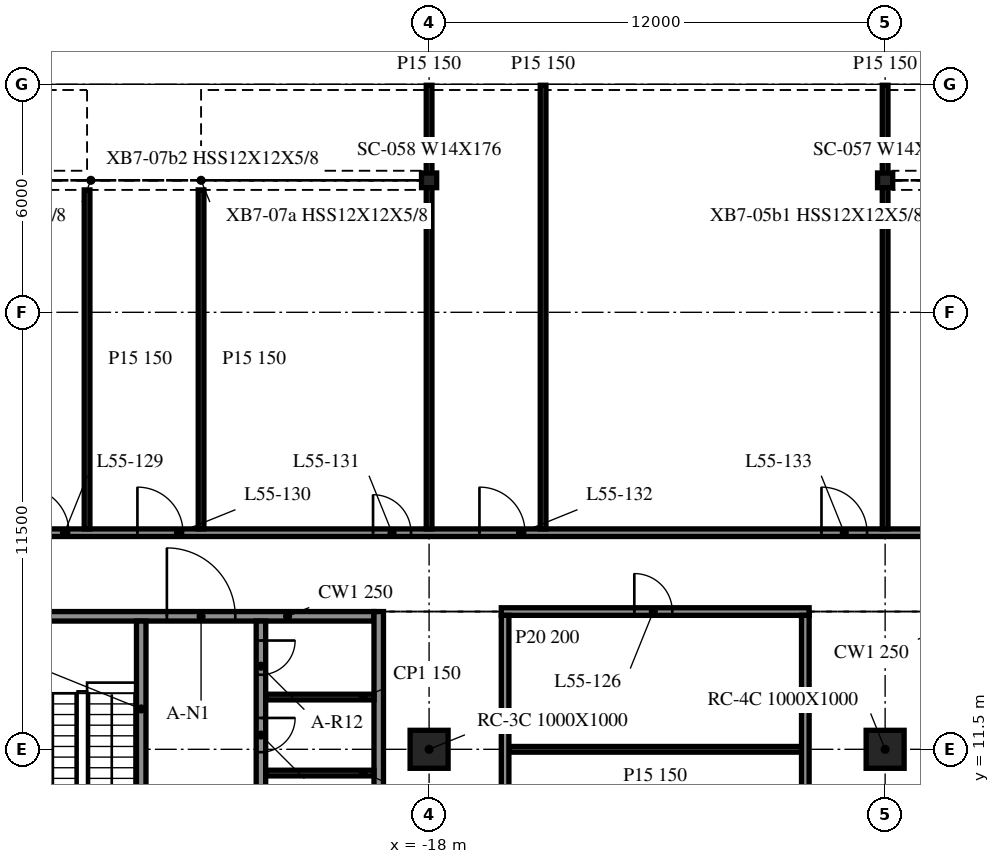
"""IFC4 building model, lengths in metres.
Left out: names, types, materials, properties, quantities, classifications, styles, units other than length and angle.
Written with IfcOpenShell. Run it as: python <this file> out.ifc"""

import sys

from ifc_helpers import new_model, si_unit, direction, frame, frame_2d, origin, origin_2d, place, context, subcontext, project, spatial, rectangle, i_section, extrude, element, fill, save


model = new_model("IFC4")
c1 = context("Model", 3, precision=1e-05, world=origin(), true_north=direction((0.0, 1.0)))
c2 = subcontext(c1, "Body", "Model", "MODEL_VIEW")
j1 = project(units=[si_unit("LENGTHUNIT", "METRE"), si_unit("PLANEANGLEUNIT", "RADIAN")], contexts=[c1])
p1 = place(None, origin())
s1 = spatial("IfcSite", under=j1, at=p1, CompositionType="ELEMENT")
p2 = place(p1, origin())
s2 = spatial("IfcBuilding", under=s1, at=p2, CompositionType="ELEMENT")
p3 = place(p2, frame((0.0, 0.0, 228.6)))
s3 = spatial("IfcBuildingStorey", under=s2, at=p3, CompositionType="ELEMENT", Elevation=228.6)
for number, where, z_axis, x_axis in (
    (1, (-18.0, 11.5, -0.34), (0.0, 0.0, 1.0), (1.0, 0.0, 0.0)),
    (2, (-6.0, 11.5, -0.34), (0.0, 0.0, 1.0), (1.0, 0.0, 0.0)),
):
    element("IfcColumn", number, at=place(p3, frame(where, z_axis=z_axis, x_axis=x_axis)), inside=s3, PredefinedType="COLUMN", context=c2, shape_type="SweptSolid", body=[
        extrude(rectangle(XDim=1.0, YDim=1.0, at=origin_2d()), origin(), (0.0, 0.0, 1.0), 3.8),
    ])
for number, where, z_axis, x_axis in (
    (3, (-6.0, 26.473, -0.34), (0.0, 0.0, 1.0), (1.0, 0.0, 0.0)),
    (4, (-18.0, 26.473, -0.34), (0.0, 0.0, 1.0), (1.0, 0.0, 0.0)),
):
    element("IfcColumn", number, at=place(p3, frame(where, z_axis=z_axis, x_axis=x_axis)), inside=s3, PredefinedType="COLUMN", context=c2, shape_type="SweptSolid", body=[
        extrude(i_section(OverallWidth=0.399, OverallDepth=0.386, WebThickness=0.021, FlangeThickness=0.033, at=origin_2d()), origin(), (0.0, 0.0, 1.0), 3.8),
    ])
p4 = place(p3, frame((-19.325, -9.125, 0.0), z_axis=(0.0, 0.0, 1.0), x_axis=(0.0, 1.0, 0.0)))
e5 = element("IfcWall", 5, at=p4, inside=s3, PredefinedType="SOLIDWALL", context=c2, shape_type="SweptSolid", body=[
    extrude(rectangle(XDim=24.25, YDim=0.25, at=frame_2d((12.125, 0.0))), origin(), (0.0, 0.0, 1.0), 3.46),
])
p5 = place(p3, frame((-28.55, 15.0, 0.0), z_axis=(0.0, 0.0, 1.0), x_axis=(1.0, 0.0, 0.0)))
e6 = element("IfcWall", 6, at=p5, inside=s3, PredefinedType="SOLIDWALL", context=c2, shape_type="SweptSolid", body=[
    extrude(rectangle(XDim=9.1, YDim=0.25, at=frame_2d((4.55, 0.0))), origin(), (0.0, 0.0, 1.0), 3.46),
])
p6 = place(p5, frame((3.65, 0.0, 0.0)))
e7 = element("IfcOpeningElement", 7, at=p6, cuts=e6, PredefinedType="OPENING", context=c2, shape_type="SweptSolid", body=[
    extrude(rectangle(XDim=1.8, YDim=2.1, at=frame_2d((0.9, 1.05))), frame((0.0, 0.135, 0.0), z_axis=(0.0, -1.0, 0.0), x_axis=(1.0, 0.0, 0.0)), (0.0, 0.0, 1.0), 0.27),
])
p7 = place(p3, frame((-25.575, 14.875, 0.0), z_axis=(0.0, 0.0, 1.0), x_axis=(0.0, -1.0, 0.0)))
e8 = element("IfcWall", 8, at=p7, inside=s3, PredefinedType="SOLIDWALL", context=c2, shape_type="SweptSolid", body=[
    extrude(rectangle(XDim=6.25, YDim=0.25, at=frame_2d((3.125, 0.0))), origin(), (0.0, 0.0, 1.0), 3.46),
])
p8 = place(p7, frame((4.85, 0.0, 0.0)))
e9 = element("IfcOpeningElement", 9, at=p8, cuts=e8, PredefinedType="OPENING", context=c2, shape_type="SweptSolid", body=[
    extrude(rectangle(XDim=1.0, YDim=2.1, at=frame_2d((0.5, 1.05))), frame((0.0, 0.135, 0.0), z_axis=(0.0, -1.0, 0.0), x_axis=(1.0, 0.0, 0.0)), (0.0, 0.0, 1.0), 0.27),
])
p9 = place(p3, frame((-22.425, 14.875, 0.0), z_axis=(0.0, 0.0, 1.0), x_axis=(0.0, -1.0, 0.0)))
e10 = element("IfcWall", 10, at=p9, inside=s3, PredefinedType="SOLIDWALL", context=c2, shape_type="SweptSolid", body=[
    extrude(rectangle(XDim=23.75, YDim=0.25, at=frame_2d((11.875, 0.0))), origin(), (0.0, 0.0, 1.0), 3.46),
])
p10 = place(p9, frame((15.494, 0.0, 0.0)))
e11 = element("IfcOpeningElement", 11, at=p10, cuts=e10, PredefinedType="OPENING", context=c2, shape_type="SweptSolid", body=[
    extrude(rectangle(XDim=0.9, YDim=2.1, at=frame_2d((0.45, 1.05))), frame((0.0, 0.135, 0.0), z_axis=(0.0, -1.0, 0.0), x_axis=(1.0, 0.0, 0.0)), (0.0, 0.0, 1.0), 0.27),
])
p11 = place(p9, frame((11.425, 0.0, 0.0)))
e12 = element("IfcOpeningElement", 12, at=p11, cuts=e10, PredefinedType="OPENING", context=c2, shape_type="SweptSolid", body=[
    extrude(rectangle(XDim=0.9, YDim=2.1, at=frame_2d((0.45, 1.05))), frame((0.0, 0.135, 0.0), z_axis=(0.0, -1.0, 0.0), x_axis=(1.0, 0.0, 0.0)), (0.0, 0.0, 1.0), 0.27),
])
p12 = place(p9, frame((7.356, 0.0, 0.0)))
e13 = element("IfcOpeningElement", 13, at=p12, cuts=e10, PredefinedType="OPENING", context=c2, shape_type="SweptSolid", body=[
    extrude(rectangle(XDim=0.9, YDim=2.1, at=frame_2d((0.45, 1.05))), frame((0.0, 0.135, 0.0), z_axis=(0.0, -1.0, 0.0), x_axis=(1.0, 0.0, 0.0)), (0.0, 0.0, 1.0), 0.27),
])
p13 = place(p9, frame((21.837, 0.0, 0.0)))
e14 = element("IfcOpeningElement", 14, at=p13, cuts=e10, PredefinedType="OPENING", context=c2, shape_type="SweptSolid", body=[
    extrude(rectangle(XDim=0.9, YDim=2.1, at=frame_2d((0.45, 1.05))), frame((0.0, 0.135, 0.0), z_axis=(0.0, -1.0, 0.0), x_axis=(1.0, 0.0, 0.0)), (0.0, 0.0, 1.0), 0.27),
])
p14 = place(p9, frame((18.762, 0.0, 0.0)))
e15 = element("IfcOpeningElement", 15, at=p14, cuts=e10, PredefinedType="OPENING", context=c2, shape_type="SweptSolid", body=[
    extrude(rectangle(XDim=0.9, YDim=2.1, at=frame_2d((0.45, 1.05))), frame((0.0, 0.135, 0.0), z_axis=(0.0, -1.0, 0.0), x_axis=(1.0, 0.0, 0.0)), (0.0, 0.0, 1.0), 0.27),
])
p15 = place(p9, frame((4.587, 0.0, 0.0)))
e16 = element("IfcOpeningElement", 16, at=p15, cuts=e10, PredefinedType="OPENING", context=c2, shape_type="SweptSolid", body=[
    extrude(rectangle(XDim=0.9, YDim=2.1, at=frame_2d((0.45, 1.05))), frame((0.0, 0.135, 0.0), z_axis=(0.0, -1.0, 0.0), x_axis=(1.0, 0.0, 0.0)), (0.0, 0.0, 1.0), 0.27),
])
p16 = place(p9, frame((2.55, 0.0, 0.0)))
e17 = element("IfcOpeningElement", 17, at=p16, cuts=e10, PredefinedType="OPENING", context=c2, shape_type="SweptSolid", body=[
    extrude(rectangle(XDim=0.9, YDim=2.1, at=frame_2d((0.45, 1.05))), frame((0.0, 0.135, 0.0), z_axis=(0.0, -1.0, 0.0), x_axis=(1.0, 0.0, 0.0)), (0.0, 0.0, 1.0), 0.27),
])
p17 = place(p9, frame((0.512, 0.0, 0.0)))
e18 = element("IfcOpeningElement", 18, at=p17, cuts=e10, PredefinedType="OPENING", context=c2, shape_type="SweptSolid", body=[
    extrude(rectangle(XDim=0.9, YDim=2.1, at=frame_2d((0.45, 1.05))), frame((0.0, 0.135, 0.0), z_axis=(0.0, -1.0, 0.0), x_axis=(1.0, 0.0, 0.0)), (0.0, 0.0, 1.0), 0.27),
])
for number, where, z_axis, x_axis in (
    (19, (-22.3, 10.875, 0.0), (0.0, 0.0, 1.0), (1.0, 0.0, 0.0)),
    (20, (-22.3, 12.875, 0.0), (0.0, 0.0, 1.0), (1.0, 0.0, 0.0)),
):
    element("IfcWall", number, at=place(p3, frame(where, z_axis=z_axis, x_axis=x_axis)), inside=s3, PredefinedType="PARTITIONING", context=c2, shape_type="SweptSolid", body=[
        extrude(rectangle(XDim=2.85, YDim=0.15, at=frame_2d((1.425, 0.0))), origin(), (0.0, 0.0, 1.0), 3.46),
    ])
p18 = place(p3, frame((-15.9, 11.5, 0.0), z_axis=(0.0, 0.0, 1.0), x_axis=(1.0, 0.0, 0.0)))
e21 = element("IfcWall", 21, at=p18, inside=s3, PredefinedType="PARTITIONING", context=c2, shape_type="SweptSolid", body=[
    extrude(rectangle(XDim=7.7, YDim=0.15, at=frame_2d((3.85, 0.0))), origin(), (0.0, 0.0, 1.0), 3.46),
])
p19 = place(p3, frame((-16.1, 15.125, 0.0), z_axis=(0.0, 0.0, 1.0), x_axis=(1.0, 0.0, 0.0)))
e22 = element("IfcWall", 22, at=p19, inside=s3, PredefinedType="PARTITIONING", context=c2, shape_type="SweptSolid", body=[
    extrude(rectangle(XDim=8.1, YDim=0.2, at=frame_2d((4.05, 0.0))), origin(), (0.0, 0.0, 1.0), 3.46),
])
p20 = place(p19, frame((3.5, 0.0, 0.0)))
e23 = element("IfcOpeningElement", 23, at=p20, cuts=e22, PredefinedType="OPENING", context=c2, shape_type="SweptSolid", body=[
    extrude(rectangle(XDim=1.0, YDim=2.1, at=frame_2d((0.5, 1.05))), frame((0.0, 0.11, 0.0), z_axis=(0.0, -1.0, 0.0), x_axis=(1.0, 0.0, 0.0)), (0.0, 0.0, 1.0), 0.22),
])
p21 = place(p3, frame((-41.975, 17.2, 0.0), z_axis=(0.0, 0.0, 1.0), x_axis=(1.0, 0.0, 0.0)))
e24 = element("IfcWall", 24, at=p21, inside=s3, PredefinedType="PARTITIONING", context=c2, shape_type="SweptSolid", body=[
    extrude(rectangle(XDim=95.95, YDim=0.2, at=frame_2d((47.975, 0.0))), origin(), (0.0, 0.0, 1.0), 3.46),
])
p22 = place(p21, frame((4.5, 0.0, 0.0)))
e25 = element("IfcOpeningElement", 25, at=p22, cuts=e24, PredefinedType="OPENING", context=c2, shape_type="SweptSolid", body=[
    extrude(rectangle(XDim=1.0, YDim=2.1, at=frame_2d((0.5, 1.05))), frame((0.0, 0.11, 0.0), z_axis=(0.0, -1.0, 0.0), x_axis=(1.0, 0.0, 0.0)), (0.0, 0.0, 1.0), 0.22),
])
p23 = place(p21, frame((13.3, 0.0, 0.0)))
e26 = element("IfcOpeningElement", 26, at=p23, cuts=e24, PredefinedType="OPENING", context=c2, shape_type="SweptSolid", body=[
    extrude(rectangle(XDim=1.2, YDim=2.1, at=frame_2d((0.6, 1.05))), frame((0.0, 0.11, 0.0), z_axis=(0.0, -1.0, 0.0), x_axis=(1.0, 0.0, 0.0)), (0.0, 0.0, 1.0), 0.22),
])
p24 = place(p21, frame((16.3, 0.0, 0.0)))
e27 = element("IfcOpeningElement", 27, at=p24, cuts=e24, PredefinedType="OPENING", context=c2, shape_type="SweptSolid", body=[
    extrude(rectangle(XDim=1.2, YDim=2.1, at=frame_2d((0.6, 1.05))), frame((0.0, 0.11, 0.0), z_axis=(0.0, -1.0, 0.0), x_axis=(1.0, 0.0, 0.0)), (0.0, 0.0, 1.0), 0.22),
])
p25 = place(p21, frame((22.5, 0.0, 0.0)))
e28 = element("IfcOpeningElement", 28, at=p25, cuts=e24, PredefinedType="OPENING", context=c2, shape_type="SweptSolid", body=[
    extrude(rectangle(XDim=1.0, YDim=2.1, at=frame_2d((0.5, 1.05))), frame((0.0, 0.11, 0.0), z_axis=(0.0, -1.0, 0.0), x_axis=(1.0, 0.0, 0.0)), (0.0, 0.0, 1.0), 0.22),
])
p26 = place(p21, frame((25.3, 0.0, 0.0)))
e29 = element("IfcOpeningElement", 29, at=p26, cuts=e24, PredefinedType="OPENING", context=c2, shape_type="SweptSolid", body=[
    extrude(rectangle(XDim=1.2, YDim=2.1, at=frame_2d((0.6, 1.05))), frame((0.0, 0.11, 0.0), z_axis=(0.0, -1.0, 0.0), x_axis=(1.0, 0.0, 0.0)), (0.0, 0.0, 1.0), 0.22),
])
p27 = place(p21, frame((34.3, 0.0, 0.0)))
e30 = element("IfcOpeningElement", 30, at=p27, cuts=e24, PredefinedType="OPENING", context=c2, shape_type="SweptSolid", body=[
    extrude(rectangle(XDim=1.2, YDim=2.1, at=frame_2d((0.6, 1.05))), frame((0.0, 0.11, 0.0), z_axis=(0.0, -1.0, 0.0), x_axis=(1.0, 0.0, 0.0)), (0.0, 0.0, 1.0), 0.22),
])
p28 = place(p21, frame((42.7, 0.0, 0.0)))
e31 = element("IfcOpeningElement", 31, at=p28, cuts=e24, PredefinedType="OPENING", context=c2, shape_type="SweptSolid", body=[
    extrude(rectangle(XDim=1.0, YDim=2.1, at=frame_2d((0.5, 1.05))), frame((0.0, 0.11, 0.0), z_axis=(0.0, -1.0, 0.0), x_axis=(1.0, 0.0, 0.0)), (0.0, 0.0, 1.0), 0.22),
])
p29 = place(p21, frame((47.3, 0.0, 0.0)))
e32 = element("IfcOpeningElement", 32, at=p29, cuts=e24, PredefinedType="OPENING", context=c2, shape_type="SweptSolid", body=[
    extrude(rectangle(XDim=1.2, YDim=2.1, at=frame_2d((0.6, 1.05))), frame((0.0, 0.11, 0.0), z_axis=(0.0, -1.0, 0.0), x_axis=(1.0, 0.0, 0.0)), (0.0, 0.0, 1.0), 0.22),
])
p30 = place(p21, frame((51.1, 0.0, 0.0)))
e33 = element("IfcOpeningElement", 33, at=p30, cuts=e24, PredefinedType="OPENING", context=c2, shape_type="SweptSolid", body=[
    extrude(rectangle(XDim=1.2, YDim=2.1, at=frame_2d((0.6, 1.05))), frame((0.0, 0.11, 0.0), z_axis=(0.0, -1.0, 0.0), x_axis=(1.0, 0.0, 0.0)), (0.0, 0.0, 1.0), 0.22),
])
p31 = place(p21, frame((54.1, 0.0, 0.0)))
e34 = element("IfcOpeningElement", 34, at=p31, cuts=e24, PredefinedType="OPENING", context=c2, shape_type="SweptSolid", body=[
    extrude(rectangle(XDim=1.0, YDim=2.1, at=frame_2d((0.5, 1.05))), frame((0.0, 0.11, 0.0), z_axis=(0.0, -1.0, 0.0), x_axis=(1.0, 0.0, 0.0)), (0.0, 0.0, 1.0), 0.22),
])
p32 = place(p21, frame((60.1, 0.0, 0.0)))
e35 = element("IfcOpeningElement", 35, at=p32, cuts=e24, PredefinedType="OPENING", context=c2, shape_type="SweptSolid", body=[
    extrude(rectangle(XDim=1.2, YDim=2.1, at=frame_2d((0.6, 1.05))), frame((0.0, 0.11, 0.0), z_axis=(0.0, -1.0, 0.0), x_axis=(1.0, 0.0, 0.0)), (0.0, 0.0, 1.0), 0.22),
])
p33 = place(p21, frame((63.1, 0.0, 0.0)))
e36 = element("IfcOpeningElement", 36, at=p33, cuts=e24, PredefinedType="OPENING", context=c2, shape_type="SweptSolid", body=[
    extrude(rectangle(XDim=1.2, YDim=2.1, at=frame_2d((0.6, 1.05))), frame((0.0, 0.11, 0.0), z_axis=(0.0, -1.0, 0.0), x_axis=(1.0, 0.0, 0.0)), (0.0, 0.0, 1.0), 0.22),
])
p34 = place(p21, frame((72.1, 0.0, 0.0)))
e37 = element("IfcOpeningElement", 37, at=p34, cuts=e24, PredefinedType="OPENING", context=c2, shape_type="SweptSolid", body=[
    extrude(rectangle(XDim=1.0, YDim=2.1, at=frame_2d((0.5, 1.05))), frame((0.0, 0.11, 0.0), z_axis=(0.0, -1.0, 0.0), x_axis=(1.0, 0.0, 0.0)), (0.0, 0.0, 1.0), 0.22),
])
p35 = place(p21, frame((78.1, 0.0, 0.0)))
e38 = element("IfcOpeningElement", 38, at=p35, cuts=e24, PredefinedType="OPENING", context=c2, shape_type="SweptSolid", body=[
    extrude(rectangle(XDim=1.2, YDim=2.1, at=frame_2d((0.6, 1.05))), frame((0.0, 0.11, 0.0), z_axis=(0.0, -1.0, 0.0), x_axis=(1.0, 0.0, 0.0)), (0.0, 0.0, 1.0), 0.22),
])
p36 = place(p21, frame((87.1, 0.0, 0.0)))
e39 = element("IfcOpeningElement", 39, at=p36, cuts=e24, PredefinedType="OPENING", context=c2, shape_type="SweptSolid", body=[
    extrude(rectangle(XDim=1.2, YDim=2.1, at=frame_2d((0.6, 1.05))), frame((0.0, 0.11, 0.0), z_axis=(0.0, -1.0, 0.0), x_axis=(1.0, 0.0, 0.0)), (0.0, 0.0, 1.0), 0.22),
])
p37 = place(p21, frame((90.1, 0.0, 0.0)))
e40 = element("IfcOpeningElement", 40, at=p37, cuts=e24, PredefinedType="OPENING", context=c2, shape_type="SweptSolid", body=[
    extrude(rectangle(XDim=1.0, YDim=2.1, at=frame_2d((0.5, 1.05))), frame((0.0, 0.11, 0.0), z_axis=(0.0, -1.0, 0.0), x_axis=(1.0, 0.0, 0.0)), (0.0, 0.0, 1.0), 0.22),
])
for number, where, z_axis, x_axis in (
    (41, (-27.0, 17.3, 0.0), (0.0, 0.0, 1.0), (0.0, 1.0, 0.0)),
    (42, (-24.0, 17.3, 0.0), (0.0, 0.0, 1.0), (0.0, 1.0, 0.0)),
):
    element("IfcWall", number, at=place(p3, frame(where, z_axis=z_axis, x_axis=x_axis)), inside=s3, PredefinedType="PARTITIONING", context=c2, shape_type="SweptSolid", body=[
        extrude(rectangle(XDim=8.921, YDim=0.15, at=frame_2d((4.46, 0.0))), origin(), (0.0, 0.0, 1.0), 3.46),
    ])
p38 = place(p3, frame((-18.0, 17.3, 0.0), z_axis=(0.0, 0.0, 1.0), x_axis=(0.0, 1.0, 0.0)))
e43 = element("IfcWall", 43, at=p38, inside=s3, PredefinedType="PARTITIONING", context=c2, shape_type="SweptSolid", body=[
    extrude(rectangle(XDim=11.675, YDim=0.15, at=frame_2d((5.837, 0.0))), origin(), (0.0, 0.0, 1.0), 3.46),
])
p39 = place(p3, frame((-16.0, -9.025, 0.0), z_axis=(0.0, 0.0, 1.0), x_axis=(0.0, 1.0, 0.0)))
e44 = element("IfcWall", 44, at=p39, inside=s3, PredefinedType="PARTITIONING", context=c2, shape_type="SweptSolid", body=[
    extrude(rectangle(XDim=24.05, YDim=0.2, at=frame_2d((12.025, 0.0))), origin(), (0.0, 0.0, 1.0), 3.46),
])
p40 = place(p39, frame((11.5, 0.0, 0.0)))
e45 = element("IfcOpeningElement", 45, at=p40, cuts=e44, PredefinedType="OPENING", context=c2, shape_type="SweptSolid", body=[
    extrude(rectangle(XDim=0.9, YDim=2.1, at=frame_2d((0.45, 1.05))), frame((0.0, 0.11, 0.0), z_axis=(0.0, -1.0, 0.0), x_axis=(1.0, 0.0, 0.0)), (0.0, 0.0, 1.0), 0.22),
])
p41 = place(p3, frame((-15.0, 17.3, 0.0), z_axis=(0.0, 0.0, 1.0), x_axis=(0.0, 1.0, 0.0)))
e46 = element("IfcWall", 46, at=p41, inside=s3, PredefinedType="PARTITIONING", context=c2, shape_type="SweptSolid", body=[
    extrude(rectangle(XDim=11.675, YDim=0.15, at=frame_2d((5.837, 0.0))), origin(), (0.0, 0.0, 1.0), 3.46),
])
p42 = place(p3, frame((-8.1, -9.025, 0.0), z_axis=(0.0, 0.0, 1.0), x_axis=(0.0, 1.0, 0.0)))
e47 = element("IfcWall", 47, at=p42, inside=s3, PredefinedType="PARTITIONING", context=c2, shape_type="SweptSolid", body=[
    extrude(rectangle(XDim=24.05, YDim=0.2, at=frame_2d((12.025, 0.0))), origin(), (0.0, 0.0, 1.0), 3.46),
])
p43 = place(p3, frame((-6.0, 17.3, 0.0), z_axis=(0.0, 0.0, 1.0), x_axis=(0.0, 1.0, 0.0)))
e48 = element("IfcWall", 48, at=p43, inside=s3, PredefinedType="PARTITIONING", context=c2, shape_type="SweptSolid", body=[
    extrude(rectangle(XDim=11.675, YDim=0.15, at=frame_2d((5.837, 0.0))), origin(), (0.0, 0.0, 1.0), 3.46),
])
p44 = place(p6, origin())
e49 = element("IfcDoor", 49, at=p44, inside=s3, OperationType="DOUBLE_DOOR_SINGLE_SWING", PredefinedType="DOOR", context=c2, shape_type="SweptSolid", body=[
    extrude(rectangle(XDim=1.8, YDim=2.1, at=frame_2d((0.9, 1.05))), frame((0.0, 0.025, 0.0), z_axis=(0.0, -1.0, 0.0), x_axis=(1.0, 0.0, 0.0)), (0.0, 0.0, 1.0), 0.05),
])
fill(e7, e49)
p45 = place(p16, origin())
e50 = element("IfcDoor", 50, at=p45, inside=s3, OperationType="SINGLE_SWING_LEFT", PredefinedType="DOOR", context=c2, shape_type="SweptSolid", body=[
    extrude(rectangle(XDim=0.9, YDim=2.1, at=frame_2d((0.45, 1.05))), frame((0.0, 0.025, 0.0), z_axis=(0.0, -1.0, 0.0), x_axis=(1.0, 0.0, 0.0)), (0.0, 0.0, 1.0), 0.05),
])
fill(e17, e50)
p46 = place(p17, origin())
e51 = element("IfcDoor", 51, at=p46, inside=s3, OperationType="SINGLE_SWING_RIGHT", PredefinedType="DOOR", context=c2, shape_type="SweptSolid", body=[
    extrude(rectangle(XDim=0.9, YDim=2.1, at=frame_2d((0.45, 1.05))), frame((0.0, 0.025, 0.0), z_axis=(0.0, -1.0, 0.0), x_axis=(1.0, 0.0, 0.0)), (0.0, 0.0, 1.0), 0.05),
])
fill(e18, e51)
p47 = place(p20, origin())
e52 = element("IfcDoor", 52, at=p47, inside=s3, OperationType="SINGLE_SWING_RIGHT", PredefinedType="DOOR", context=c2, shape_type="SweptSolid", body=[
    extrude(rectangle(XDim=1.0, YDim=2.1, at=frame_2d((0.5, 1.05))), frame((0.0, 0.025, 0.0), z_axis=(0.0, -1.0, 0.0), x_axis=(1.0, 0.0, 0.0)), (0.0, 0.0, 1.0), 0.05),
])
fill(e23, e52)
p48 = place(p23, origin())
e53 = element("IfcDoor", 53, at=p48, inside=s3, OperationType="SINGLE_SWING_LEFT", PredefinedType="DOOR", context=c2, shape_type="SweptSolid", body=[
    extrude(rectangle(XDim=1.2, YDim=2.1, at=frame_2d((0.6, 1.05))), frame((0.0, 0.025, 0.0), z_axis=(0.0, -1.0, 0.0), x_axis=(1.0, 0.0, 0.0)), (0.0, 0.0, 1.0), 0.05),
])
fill(e26, e53)
p49 = place(p24, origin())
e54 = element("IfcDoor", 54, at=p49, inside=s3, OperationType="SINGLE_SWING_LEFT", PredefinedType="DOOR", context=c2, shape_type="SweptSolid", body=[
    extrude(rectangle(XDim=1.2, YDim=2.1, at=frame_2d((0.6, 1.05))), frame((0.0, 0.025, 0.0), z_axis=(0.0, -1.0, 0.0), x_axis=(1.0, 0.0, 0.0)), (0.0, 0.0, 1.0), 0.05),
])
fill(e27, e54)
p50 = place(p25, origin())
e55 = element("IfcDoor", 55, at=p50, inside=s3, OperationType="SINGLE_SWING_LEFT", PredefinedType="DOOR", context=c2, shape_type="SweptSolid", body=[
    extrude(rectangle(XDim=1.0, YDim=2.1, at=frame_2d((0.5, 1.05))), frame((0.0, 0.025, 0.0), z_axis=(0.0, -1.0, 0.0), x_axis=(1.0, 0.0, 0.0)), (0.0, 0.0, 1.0), 0.05),
])
fill(e28, e55)
p51 = place(p26, origin())
e56 = element("IfcDoor", 56, at=p51, inside=s3, OperationType="SINGLE_SWING_LEFT", PredefinedType="DOOR", context=c2, shape_type="SweptSolid", body=[
    extrude(rectangle(XDim=1.2, YDim=2.1, at=frame_2d((0.6, 1.05))), frame((0.0, 0.025, 0.0), z_axis=(0.0, -1.0, 0.0), x_axis=(1.0, 0.0, 0.0)), (0.0, 0.0, 1.0), 0.05),
])
fill(e29, e56)
p52 = place(p27, origin())
e57 = element("IfcDoor", 57, at=p52, inside=s3, OperationType="SINGLE_SWING_LEFT", PredefinedType="DOOR", context=c2, shape_type="SweptSolid", body=[
    extrude(rectangle(XDim=1.2, YDim=2.1, at=frame_2d((0.6, 1.05))), frame((0.0, 0.025, 0.0), z_axis=(0.0, -1.0, 0.0), x_axis=(1.0, 0.0, 0.0)), (0.0, 0.0, 1.0), 0.05),
])
fill(e30, e57)
save(model, sys.argv[1])
